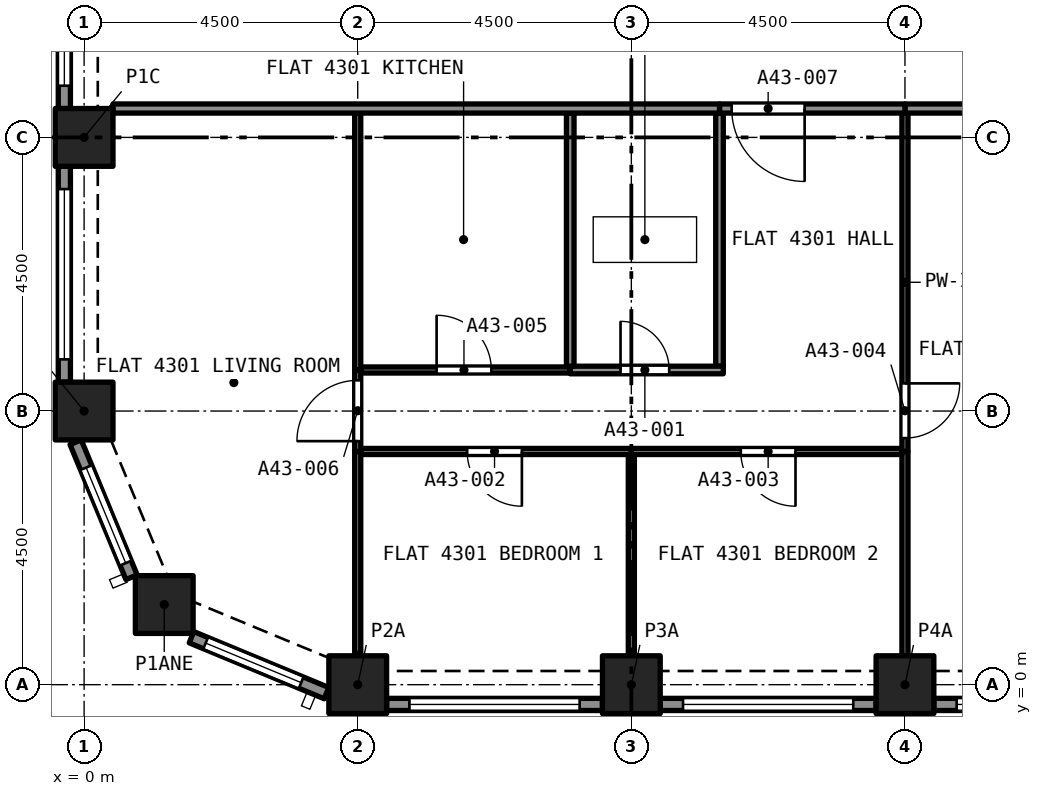
"""IFC4 building model, lengths in metres.
Left out: names, types, materials, properties, quantities, classifications, styles, units other than length and angle.
Written with IfcOpenShell. Run it as: python <this file> out.ifc"""

import sys

from ifc_helpers import new_model, si_unit, direction, frame, frame_2d, origin, origin_2d, place, context, subcontext, project, spatial, rectangle, extrude, element, fill, save


model = new_model("IFC4")
c1 = context("Model", 3, precision=1e-05, world=origin(), true_north=direction((0.0, 1.0)))
c2 = subcontext(c1, "Body", "Model", "MODEL_VIEW")
j1 = project(units=[si_unit("LENGTHUNIT", "METRE"), si_unit("PLANEANGLEUNIT", "RADIAN")], contexts=[c1])
p1 = place(None, origin())
s1 = spatial("IfcSite", under=j1, at=p1, CompositionType="ELEMENT")
p2 = place(p1, origin())
s2 = spatial("IfcBuilding", under=s1, at=p2, CompositionType="ELEMENT")
p3 = place(p2, frame((0.0, 0.0, 155.0)))
s3 = spatial("IfcBuildingStorey", under=s2, at=p3, CompositionType="ELEMENT", Elevation=155.0)
for number, where, z_axis, x_axis in (
    (1, (4.5, 0.0, 0.0), (0.0, 0.0, 1.0), (1.0, 0.0, 0.0)),
    (2, (9.0, 0.0, 0.0), (0.0, 0.0, 1.0), (1.0, 0.0, 0.0)),
    (3, (13.5, 0.0, 0.0), (0.0, 0.0, 1.0), (1.0, 0.0, 0.0)),
    (4, (1.318, 1.318, 0.0), (0.0, 0.0, 1.0), (1.0, 0.0, 0.0)),
    (5, (0.0, 4.5, 0.0), (0.0, 0.0, 1.0), (1.0, 0.0, 0.0)),
    (6, (0.0, 9.0, 0.0), (0.0, 0.0, 1.0), (1.0, 0.0, 0.0)),
):
    element("IfcColumn", number, at=place(p3, frame(where, z_axis=z_axis, x_axis=x_axis)), inside=s3, PredefinedType="COLUMN", context=c2, shape_type="SweptSolid", body=[
        extrude(rectangle(XDim=0.95, YDim=0.95, at=origin_2d()), origin(), (0.0, 0.0, 1.0), 4.4),
    ])
p4 = place(p3, frame((-0.325, 9.475, 0.0), z_axis=(0.0, 0.0, 1.0), x_axis=(0.0, 1.0, 0.0)))
e7 = element("IfcWall", 7, at=p4, inside=s3, PredefinedType="SOLIDWALL", context=c2, shape_type="SweptSolid", body=[
    extrude(rectangle(XDim=3.55, YDim=0.2, at=frame_2d((1.775, 0.0))), origin(), (0.0, 0.0, 1.0), 4.4),
])
p5 = place(p4, frame((0.375, 0.0, 0.45)))
e8 = element("IfcOpeningElement", 8, at=p5, cuts=e7, PredefinedType="OPENING", context=c2, shape_type="SweptSolid", body=[
    extrude(rectangle(XDim=2.8, YDim=2.55, at=frame_2d((1.4, 1.275))), frame((0.0, 0.11, 0.0), z_axis=(0.0, -1.0, 0.0), x_axis=(1.0, 0.0, 0.0)), (0.0, 0.0, 1.0), 0.22),
])
p6 = place(p3, frame((-0.325, 4.975, 0.0), z_axis=(0.0, 0.0, 1.0), x_axis=(0.0, 1.0, 0.0)))
e9 = element("IfcWall", 9, at=p6, inside=s3, PredefinedType="SOLIDWALL", context=c2, shape_type="SweptSolid", body=[
    extrude(rectangle(XDim=3.55, YDim=0.2, at=frame_2d((1.775, 0.0))), origin(), (0.0, 0.0, 1.0), 4.4),
])
p7 = place(p6, frame((0.375, 0.0, 0.45)))
e10 = element("IfcOpeningElement", 10, at=p7, cuts=e9, PredefinedType="OPENING", context=c2, shape_type="SweptSolid", body=[
    extrude(rectangle(XDim=2.8, YDim=2.55, at=frame_2d((1.4, 1.275))), frame((0.0, 0.11, 0.0), z_axis=(0.0, -1.0, 0.0), x_axis=(1.0, 0.0, 0.0)), (0.0, 0.0, 1.0), 0.22),
])
p8 = place(p3, frame((0.78, 1.767, 0.0), z_axis=(0.0, 0.0, 1.0), x_axis=(-0.382680855588, 0.923880599843, 0.0)))
e11 = element("IfcWall", 11, at=p8, inside=s3, PredefinedType="SOLIDWALL", context=c2, shape_type="SweptSolid", body=[
    extrude(rectangle(XDim=2.403, YDim=0.2, at=frame_2d((1.201, 0.0))), origin(), (0.0, 0.0, 1.0), 4.4),
])
p9 = place(p8, frame((0.251, 0.0, 0.45)))
e12 = element("IfcOpeningElement", 12, at=p9, cuts=e11, PredefinedType="OPENING", context=c2, shape_type="SweptSolid", body=[
    extrude(rectangle(XDim=1.7, YDim=2.55, at=frame_2d((0.85, 1.275))), frame((0.0, 0.11, 0.0), z_axis=(0.0, -1.0, 0.0), x_axis=(1.0, 0.0, 0.0)), (0.0, 0.0, 1.0), 0.22),
])
p10 = place(p3, frame((3.987, -0.139, 0.0), z_axis=(0.0, 0.0, 1.0), x_axis=(-0.923880599843, 0.382680855588, 0.0)))
e13 = element("IfcWall", 13, at=p10, inside=s3, PredefinedType="SOLIDWALL", context=c2, shape_type="SweptSolid", body=[
    extrude(rectangle(XDim=2.403, YDim=0.2, at=frame_2d((1.201, 0.0))), origin(), (0.0, 0.0, 1.0), 4.4),
])
p11 = place(p10, frame((0.451, 0.0, 0.45)))
e14 = element("IfcOpeningElement", 14, at=p11, cuts=e13, PredefinedType="OPENING", context=c2, shape_type="SweptSolid", body=[
    extrude(rectangle(XDim=1.7, YDim=2.55, at=frame_2d((0.85, 1.275))), frame((0.0, 0.11, 0.0), z_axis=(0.0, -1.0, 0.0), x_axis=(1.0, 0.0, 0.0)), (0.0, 0.0, 1.0), 0.22),
])
p12 = place(p3, frame((8.525, -0.325, 0.0), z_axis=(0.0, 0.0, 1.0), x_axis=(-1.0, 0.0, 0.0)))
e15 = element("IfcWall", 15, at=p12, inside=s3, PredefinedType="SOLIDWALL", context=c2, shape_type="SweptSolid", body=[
    extrude(rectangle(XDim=3.55, YDim=0.2, at=frame_2d((1.775, 0.0))), origin(), (0.0, 0.0, 1.0), 4.4),
])
p13 = place(p12, frame((0.375, 0.0, 0.45)))
e16 = element("IfcOpeningElement", 16, at=p13, cuts=e15, PredefinedType="OPENING", context=c2, shape_type="SweptSolid", body=[
    extrude(rectangle(XDim=2.8, YDim=2.55, at=frame_2d((1.4, 1.275))), frame((0.0, 0.11, 0.0), z_axis=(0.0, -1.0, 0.0), x_axis=(1.0, 0.0, 0.0)), (0.0, 0.0, 1.0), 0.22),
])
p14 = place(p3, frame((13.025, -0.325, 0.0), z_axis=(0.0, 0.0, 1.0), x_axis=(-1.0, 0.0, 0.0)))
e17 = element("IfcWall", 17, at=p14, inside=s3, PredefinedType="SOLIDWALL", context=c2, shape_type="SweptSolid", body=[
    extrude(rectangle(XDim=3.55, YDim=0.2, at=frame_2d((1.775, 0.0))), origin(), (0.0, 0.0, 1.0), 4.4),
])
p15 = place(p14, frame((0.375, 0.0, 0.45)))
e18 = element("IfcOpeningElement", 18, at=p15, cuts=e17, PredefinedType="OPENING", context=c2, shape_type="SweptSolid", body=[
    extrude(rectangle(XDim=2.8, YDim=2.55, at=frame_2d((1.4, 1.275))), frame((0.0, 0.11, 0.0), z_axis=(0.0, -1.0, 0.0), x_axis=(1.0, 0.0, 0.0)), (0.0, 0.0, 1.0), 0.22),
])
p16 = place(p3, frame((17.525, -0.325, 0.0), z_axis=(0.0, 0.0, 1.0), x_axis=(-1.0, 0.0, 0.0)))
e19 = element("IfcWall", 19, at=p16, inside=s3, PredefinedType="SOLIDWALL", context=c2, shape_type="SweptSolid", body=[
    extrude(rectangle(XDim=3.55, YDim=0.2, at=frame_2d((1.775, 0.0))), origin(), (0.0, 0.0, 1.0), 4.4),
])
p17 = place(p16, frame((0.375, 0.0, 0.45)))
e20 = element("IfcOpeningElement", 20, at=p17, cuts=e19, PredefinedType="OPENING", context=c2, shape_type="SweptSolid", body=[
    extrude(rectangle(XDim=2.8, YDim=2.55, at=frame_2d((1.4, 1.275))), frame((0.0, 0.11, 0.0), z_axis=(0.0, -1.0, 0.0), x_axis=(1.0, 0.0, 0.0)), (0.0, 0.0, 1.0), 0.22),
])
p18 = place(p3, frame((10.45, 5.238, 0.0), z_axis=(0.0, 0.0, 1.0), x_axis=(0.0, 1.0, 0.0)))
e21 = element("IfcWall", 21, at=p18, inside=s3, PredefinedType="PARTITIONING", context=c2, shape_type="SweptSolid", body=[
    extrude(rectangle(XDim=4.162, YDim=0.125, at=frame_2d((2.081, 0.0))), origin(), (0.0, 0.0, 1.0), 4.1),
])
p19 = place(p3, frame((7.995, 5.175, 0.0), z_axis=(0.0, 0.0, 1.0), x_axis=(1.0, 0.0, 0.0)))
e22 = element("IfcWall", 22, at=p19, inside=s3, PredefinedType="PARTITIONING", context=c2, shape_type="SweptSolid", body=[
    extrude(rectangle(XDim=2.518, YDim=0.125, at=frame_2d((1.259, 0.0))), origin(), (0.0, 0.0, 1.0), 4.1),
])
p20 = place(p19, frame((0.828, 0.0, 0.0)))
e23 = element("IfcOpeningElement", 23, at=p20, cuts=e22, PredefinedType="OPENING", context=c2, shape_type="SweptSolid", body=[
    extrude(rectangle(XDim=0.8, YDim=2.1, at=frame_2d((0.4, 1.05))), frame((0.0, 0.073, 0.0), z_axis=(0.0, -1.0, 0.0), x_axis=(1.0, 0.0, 0.0)), (0.0, 0.0, 1.0), 0.145),
])
p21 = place(p3, frame((7.995, 5.238, 0.0), z_axis=(0.0, 0.0, 1.0), x_axis=(0.0, 1.0, 0.0)))
e24 = element("IfcWall", 24, at=p21, inside=s3, PredefinedType="PARTITIONING", context=c2, shape_type="SweptSolid", body=[
    extrude(rectangle(XDim=4.162, YDim=0.125, at=frame_2d((2.081, 0.0))), origin(), (0.0, 0.0, 1.0), 4.1),
])
p22 = place(p3, frame((9.0, 0.475, 0.0), z_axis=(0.0, 0.0, 1.0), x_axis=(0.0, 1.0, 0.0)))
e25 = element("IfcWall", 25, at=p22, inside=s3, PredefinedType="PARTITIONING", context=c2, shape_type="SweptSolid", body=[
    extrude(rectangle(XDim=3.31, YDim=0.1, at=frame_2d((1.655, 0.0))), origin(), (0.0, 0.0, 1.0), 4.1),
])
p23 = place(p3, frame((9.0, 3.835, 0.0), z_axis=(0.0, 0.0, 1.0), x_axis=(-1.0, 0.0, 0.0)))
e26 = element("IfcWall", 26, at=p23, inside=s3, PredefinedType="PARTITIONING", context=c2, shape_type="SweptSolid", body=[
    extrude(rectangle(XDim=4.45, YDim=0.1, at=frame_2d((2.225, 0.0))), origin(), (0.0, 0.0, 1.0), 4.1),
])
p24 = place(p23, frame((1.8, 0.0, 0.0)))
e27 = element("IfcOpeningElement", 27, at=p24, cuts=e26, PredefinedType="OPENING", context=c2, shape_type="SweptSolid", body=[
    extrude(rectangle(XDim=0.9, YDim=2.1, at=frame_2d((0.45, 1.05))), frame((0.0, 0.06, 0.0), z_axis=(0.0, -1.0, 0.0), x_axis=(1.0, 0.0, 0.0)), (0.0, 0.0, 1.0), 0.12),
])
p25 = place(p3, frame((4.5, 0.514, 0.0), z_axis=(0.0, 0.0, 1.0), x_axis=(0.0, 1.0, 0.0)))
e28 = element("IfcWall", 28, at=p25, inside=s3, PredefinedType="PARTITIONING", context=c2, shape_type="SweptSolid", body=[
    extrude(rectangle(XDim=3.321, YDim=0.1, at=frame_2d((1.66, 0.0))), origin(), (0.0, 0.0, 1.0), 4.1),
])
p26 = place(p3, frame((13.5, 0.475, 0.0), z_axis=(0.0, 0.0, 1.0), x_axis=(0.0, 1.0, 0.0)))
e29 = element("IfcWall", 29, at=p26, inside=s3, PredefinedType="PARTITIONING", context=c2, shape_type="SweptSolid", body=[
    extrude(rectangle(XDim=3.36, YDim=0.1, at=frame_2d((1.68, 0.0))), origin(), (0.0, 0.0, 1.0), 4.1),
])
p27 = place(p3, frame((13.45, 3.835, 0.0), z_axis=(0.0, 0.0, 1.0), x_axis=(-1.0, 0.0, 0.0)))
e30 = element("IfcWall", 30, at=p27, inside=s3, PredefinedType="PARTITIONING", context=c2, shape_type="SweptSolid", body=[
    extrude(rectangle(XDim=4.45, YDim=0.1, at=frame_2d((2.225, 0.0))), origin(), (0.0, 0.0, 1.0), 4.1),
])
p28 = place(p27, frame((1.75, 0.0, 0.0)))
e31 = element("IfcOpeningElement", 31, at=p28, cuts=e30, PredefinedType="OPENING", context=c2, shape_type="SweptSolid", body=[
    extrude(rectangle(XDim=0.9, YDim=2.1, at=frame_2d((0.45, 1.05))), frame((0.0, 0.06, 0.0), z_axis=(0.0, -1.0, 0.0), x_axis=(1.0, 0.0, 0.0)), (0.0, 0.0, 1.0), 0.12),
])
p29 = place(p3, frame((13.5, 9.4, 0.0), z_axis=(0.0, 0.0, 1.0), x_axis=(0.0, -1.0, 0.0)))
e32 = element("IfcWall", 32, at=p29, inside=s3, PredefinedType="PARTITIONING", context=c2, shape_type="SweptSolid", body=[
    extrude(rectangle(XDim=5.565, YDim=0.1, at=frame_2d((2.782, 0.0))), origin(), (0.0, 0.0, 1.0), 4.1),
])
p30 = place(p29, frame((4.445, 0.0, 0.0)))
e33 = element("IfcOpeningElement", 33, at=p30, cuts=e32, PredefinedType="OPENING", context=c2, shape_type="SweptSolid", body=[
    extrude(rectangle(XDim=0.9, YDim=2.1, at=frame_2d((0.45, 1.05))), frame((0.0, 0.06, 0.0), z_axis=(0.0, -1.0, 0.0), x_axis=(1.0, 0.0, 0.0)), (0.0, 0.0, 1.0), 0.12),
])
p31 = place(p3, frame((13.5, 9.475, 0.0), z_axis=(0.0, 0.0, 1.0), x_axis=(1.0, 0.0, 0.0)))
e34 = element("IfcWall", 34, at=p31, inside=s3, PredefinedType="PARTITIONING", context=c2, shape_type="SweptSolid", body=[
    extrude(rectangle(XDim=4.025, YDim=0.15, at=frame_2d((2.012, 0.0))), origin(), (0.0, 0.0, 1.0), 4.1),
])
p32 = place(p3, frame((4.55, 5.175, 0.0), z_axis=(0.0, 0.0, 1.0), x_axis=(1.0, 0.0, 0.0)))
e35 = element("IfcWall", 35, at=p32, inside=s3, PredefinedType="PARTITIONING", context=c2, shape_type="SweptSolid", body=[
    extrude(rectangle(XDim=3.445, YDim=0.1, at=frame_2d((1.722, 0.0))), origin(), (0.0, 0.0, 1.0), 4.1),
])
p33 = place(p32, frame((1.247, 0.0, 0.0)))
e36 = element("IfcOpeningElement", 36, at=p33, cuts=e35, PredefinedType="OPENING", context=c2, shape_type="SweptSolid", body=[
    extrude(rectangle(XDim=0.9, YDim=2.1, at=frame_2d((0.45, 1.05))), frame((0.0, 0.06, 0.0), z_axis=(0.0, -1.0, 0.0), x_axis=(1.0, 0.0, 0.0)), (0.0, 0.0, 1.0), 0.12),
])
p34 = place(p3, frame((4.5, 3.835, 0.0), z_axis=(0.0, 0.0, 1.0), x_axis=(0.0, 1.0, 0.0)))
e37 = element("IfcWall", 37, at=p34, inside=s3, PredefinedType="PARTITIONING", context=c2, shape_type="SweptSolid", body=[
    extrude(rectangle(XDim=1.34, YDim=0.1, at=frame_2d((0.67, 0.0))), origin(), (0.0, 0.0, 1.0), 4.1),
])
p35 = place(p34, frame((0.17, 0.0, 0.0)))
e38 = element("IfcOpeningElement", 38, at=p35, cuts=e37, PredefinedType="OPENING", context=c2, shape_type="SweptSolid", body=[
    extrude(rectangle(XDim=1.0, YDim=2.1, at=frame_2d((0.5, 1.05))), frame((0.0, 0.06, 0.0), z_axis=(0.0, -1.0, 0.0), x_axis=(1.0, 0.0, 0.0)), (0.0, 0.0, 1.0), 0.12),
])
p36 = place(p3, frame((13.5, 9.475, 0.0), z_axis=(0.0, 0.0, 1.0), x_axis=(-1.0, 0.0, 0.0)))
e39 = element("IfcWall", 39, at=p36, inside=s3, PredefinedType="PARTITIONING", context=c2, shape_type="SweptSolid", body=[
    extrude(rectangle(XDim=3.05, YDim=0.15, at=frame_2d((1.525, 0.0))), origin(), (0.0, 0.0, 1.0), 4.1),
])
p37 = place(p36, frame((1.65, 0.0, 0.0)))
e40 = element("IfcOpeningElement", 40, at=p37, cuts=e39, PredefinedType="OPENING", context=c2, shape_type="SweptSolid", body=[
    extrude(rectangle(XDim=1.2, YDim=2.4, at=frame_2d((0.6, 1.2))), frame((0.0, 0.085, 0.0), z_axis=(0.0, -1.0, 0.0), x_axis=(1.0, 0.0, 0.0)), (0.0, 0.0, 1.0), 0.17),
])
p38 = place(p3, frame((4.5, 5.175, 0.0), z_axis=(0.0, 0.0, 1.0), x_axis=(0.0, 1.0, 0.0)))
e41 = element("IfcWall", 41, at=p38, inside=s3, PredefinedType="PARTITIONING", context=c2, shape_type="SweptSolid", body=[
    extrude(rectangle(XDim=4.225, YDim=0.1, at=frame_2d((2.112, 0.0))), origin(), (0.0, 0.0, 1.0), 4.1),
])
p39 = place(p3, frame((0.475, 9.475, 0.0), z_axis=(0.0, 0.0, 1.0), x_axis=(1.0, 0.0, 0.0)))
e42 = element("IfcWall", 42, at=p39, inside=s3, PredefinedType="PARTITIONING", context=c2, shape_type="SweptSolid", body=[
    extrude(rectangle(XDim=9.975, YDim=0.15, at=frame_2d((4.987, 0.0))), origin(), (0.0, 0.0, 1.0), 4.1),
])
p40 = place(p5, origin())
e43 = element("IfcWindow", 43, at=p40, inside=s3, PartitioningType="SINGLE_PANEL", PredefinedType="WINDOW", context=c2, shape_type="SweptSolid", body=[
    extrude(rectangle(XDim=2.8, YDim=2.55, at=frame_2d((1.4, 1.275))), frame((0.0, 0.03, 0.0), z_axis=(0.0, -1.0, 0.0), x_axis=(1.0, 0.0, 0.0)), (0.0, 0.0, 1.0), 0.06),
])
fill(e8, e43)
p41 = place(p7, origin())
e44 = element("IfcWindow", 44, at=p41, inside=s3, PartitioningType="SINGLE_PANEL", PredefinedType="WINDOW", context=c2, shape_type="SweptSolid", body=[
    extrude(rectangle(XDim=2.8, YDim=2.55, at=frame_2d((1.4, 1.275))), frame((0.0, 0.03, 0.0), z_axis=(0.0, -1.0, 0.0), x_axis=(1.0, 0.0, 0.0)), (0.0, 0.0, 1.0), 0.06),
])
fill(e10, e44)
p42 = place(p9, origin())
e45 = element("IfcWindow", 45, at=p42, inside=s3, PartitioningType="SINGLE_PANEL", PredefinedType="WINDOW", context=c2, shape_type="SweptSolid", body=[
    extrude(rectangle(XDim=1.7, YDim=2.55, at=frame_2d((0.85, 1.275))), frame((0.0, 0.03, 0.0), z_axis=(0.0, -1.0, 0.0), x_axis=(1.0, 0.0, 0.0)), (0.0, 0.0, 1.0), 0.06),
])
fill(e12, e45)
p43 = place(p11, origin())
e46 = element("IfcWindow", 46, at=p43, inside=s3, PartitioningType="SINGLE_PANEL", PredefinedType="WINDOW", context=c2, shape_type="SweptSolid", body=[
    extrude(rectangle(XDim=1.7, YDim=2.55, at=frame_2d((0.85, 1.275))), frame((0.0, 0.03, 0.0), z_axis=(0.0, -1.0, 0.0), x_axis=(1.0, 0.0, 0.0)), (0.0, 0.0, 1.0), 0.06),
])
fill(e14, e46)
p44 = place(p13, origin())
e47 = element("IfcWindow", 47, at=p44, inside=s3, PartitioningType="SINGLE_PANEL", PredefinedType="WINDOW", context=c2, shape_type="SweptSolid", body=[
    extrude(rectangle(XDim=2.8, YDim=2.55, at=frame_2d((1.4, 1.275))), frame((0.0, 0.03, 0.0), z_axis=(0.0, -1.0, 0.0), x_axis=(1.0, 0.0, 0.0)), (0.0, 0.0, 1.0), 0.06),
])
fill(e16, e47)
p45 = place(p15, origin())
e48 = element("IfcWindow", 48, at=p45, inside=s3, PartitioningType="SINGLE_PANEL", PredefinedType="WINDOW", context=c2, shape_type="SweptSolid", body=[
    extrude(rectangle(XDim=2.8, YDim=2.55, at=frame_2d((1.4, 1.275))), frame((0.0, 0.03, 0.0), z_axis=(0.0, -1.0, 0.0), x_axis=(1.0, 0.0, 0.0)), (0.0, 0.0, 1.0), 0.06),
])
fill(e18, e48)
p46 = place(p17, origin())
e49 = element("IfcWindow", 49, at=p46, inside=s3, PartitioningType="SINGLE_PANEL", PredefinedType="WINDOW", context=c2, shape_type="SweptSolid", body=[
    extrude(rectangle(XDim=2.8, YDim=2.55, at=frame_2d((1.4, 1.275))), frame((0.0, 0.03, 0.0), z_axis=(0.0, -1.0, 0.0), x_axis=(1.0, 0.0, 0.0)), (0.0, 0.0, 1.0), 0.06),
])
fill(e20, e49)
p47 = place(p20, origin())
e50 = element("IfcDoor", 50, at=p47, inside=s3, OperationType="SINGLE_SWING_LEFT", PredefinedType="DOOR", context=c2, shape_type="SweptSolid", body=[
    extrude(rectangle(XDim=0.8, YDim=2.1, at=frame_2d((0.4, 1.05))), frame((0.0, 0.025, 0.0), z_axis=(0.0, -1.0, 0.0), x_axis=(1.0, 0.0, 0.0)), (0.0, 0.0, 1.0), 0.05),
])
fill(e23, e50)
p48 = place(p24, origin())
e51 = element("IfcDoor", 51, at=p48, inside=s3, OperationType="SINGLE_SWING_RIGHT", PredefinedType="DOOR", context=c2, shape_type="SweptSolid", body=[
    extrude(rectangle(XDim=0.9, YDim=2.1, at=frame_2d((0.45, 1.05))), frame((0.0, 0.025, 0.0), z_axis=(0.0, -1.0, 0.0), x_axis=(1.0, 0.0, 0.0)), (0.0, 0.0, 1.0), 0.05),
])
fill(e27, e51)
p49 = place(p28, origin())
e52 = element("IfcDoor", 52, at=p49, inside=s3, OperationType="SINGLE_SWING_LEFT", PredefinedType="DOOR", context=c2, shape_type="SweptSolid", body=[
    extrude(rectangle(XDim=0.9, YDim=2.1, at=frame_2d((0.45, 1.05))), frame((0.0, 0.025, 0.0), z_axis=(0.0, -1.0, 0.0), x_axis=(1.0, 0.0, 0.0)), (0.0, 0.0, 1.0), 0.05),
])
fill(e31, e52)
p50 = place(p30, origin())
e53 = element("IfcDoor", 53, at=p50, inside=s3, OperationType="SINGLE_SWING_RIGHT", PredefinedType="DOOR", context=c2, shape_type="SweptSolid", body=[
    extrude(rectangle(XDim=0.9, YDim=2.1, at=frame_2d((0.45, 1.05))), frame((0.0, 0.025, 0.0), z_axis=(0.0, -1.0, 0.0), x_axis=(1.0, 0.0, 0.0)), (0.0, 0.0, 1.0), 0.05),
])
fill(e33, e53)
p51 = place(p33, origin())
e54 = element("IfcDoor", 54, at=p51, inside=s3, OperationType="SINGLE_SWING_LEFT", PredefinedType="DOOR", context=c2, shape_type="SweptSolid", body=[
    extrude(rectangle(XDim=0.9, YDim=2.1, at=frame_2d((0.45, 1.05))), frame((0.0, 0.025, 0.0), z_axis=(0.0, -1.0, 0.0), x_axis=(1.0, 0.0, 0.0)), (0.0, 0.0, 1.0), 0.05),
])
fill(e36, e54)
p52 = place(p35, origin())
e55 = element("IfcDoor", 55, at=p52, inside=s3, OperationType="SINGLE_SWING_RIGHT", PredefinedType="DOOR", context=c2, shape_type="SweptSolid", body=[
    extrude(rectangle(XDim=1.0, YDim=2.1, at=frame_2d((0.5, 1.05))), frame((0.0, 0.025, 0.0), z_axis=(0.0, -1.0, 0.0), x_axis=(1.0, 0.0, 0.0)), (0.0, 0.0, 1.0), 0.05),
])
fill(e38, e55)
p53 = place(p37, origin())
e56 = element("IfcDoor", 56, at=p53, inside=s3, OperationType="SINGLE_SWING_RIGHT", PredefinedType="DOOR", context=c2, shape_type="SweptSolid", body=[
    extrude(rectangle(XDim=1.2, YDim=2.4, at=frame_2d((0.6, 1.2))), frame((0.0, 0.025, 0.0), z_axis=(0.0, -1.0, 0.0), x_axis=(1.0, 0.0, 0.0)), (0.0, 0.0, 1.0), 0.05),
])
fill(e40, e56)
save(model, sys.argv[1])
